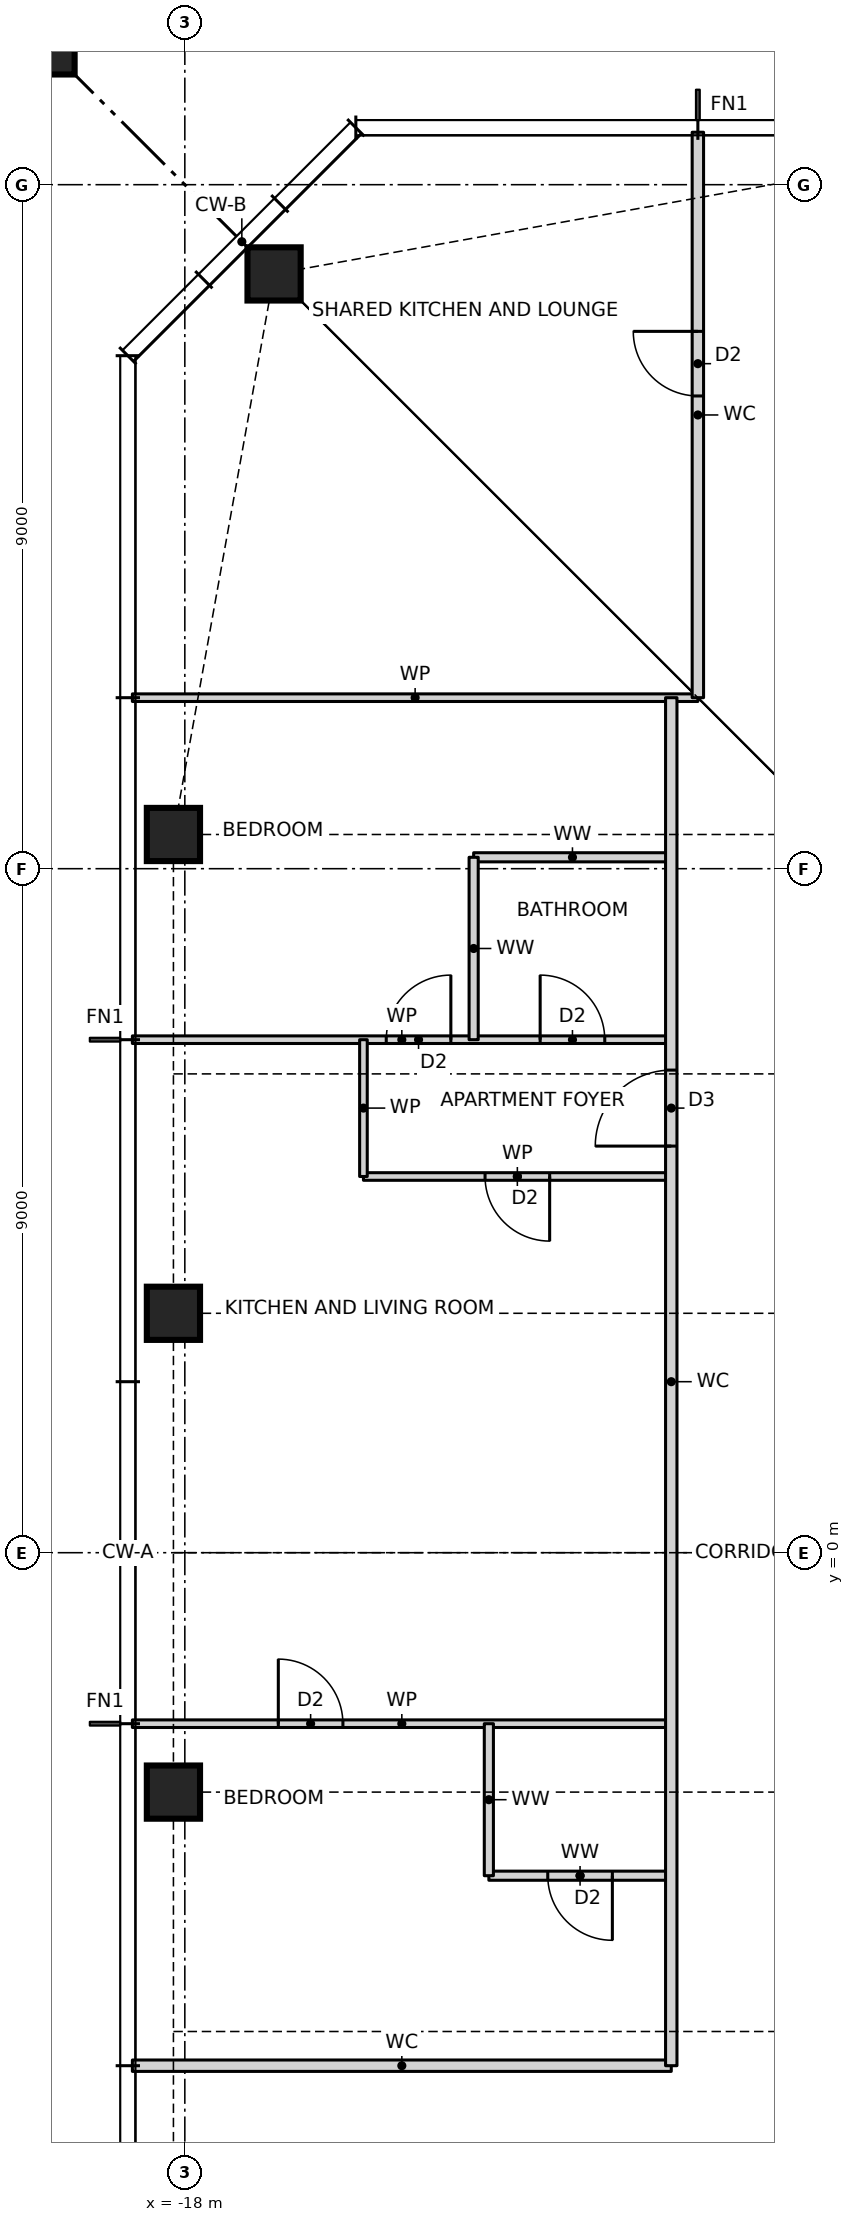
"""IFC4 building model, lengths in metres.
Left out: names, types, materials, properties, quantities, classifications, styles, units other than length and angle.
Written with IfcOpenShell. Run it as: python <this file> out.ifc"""

import sys

from ifc_helpers import new_model, si_unit, direction, frame, frame_2d, origin, origin_2d, place, context, subcontext, project, spatial, rectangle, hollow_rectangle, i_section, extrude, element, fill, save


model = new_model("IFC4")
c1 = context("Model", 3, precision=1e-05, world=origin(), true_north=direction((0.0, 1.0)))
c2 = subcontext(c1, "Body", "Model", "MODEL_VIEW")
j1 = project(units=[si_unit("LENGTHUNIT", "METRE"), si_unit("PLANEANGLEUNIT", "RADIAN")], contexts=[c1])
p1 = place(None, origin())
s1 = spatial("IfcSite", under=j1, at=p1, CompositionType="ELEMENT")
p2 = place(p1, origin())
s2 = spatial("IfcBuilding", under=s1, at=p2, CompositionType="ELEMENT")
p3 = place(p2, frame((0.0, 0.0, 181.0)))
s3 = spatial("IfcBuildingStorey", under=s2, at=p3, CompositionType="ELEMENT", Elevation=181.0)
for number, where, z_axis, x_axis in (
    (1, (-16.826, 16.826, 0.0), (0.0, 0.0, 1.0), (1.0, 0.0, 0.0)),
    (2, (-18.15, 9.45, 0.0), (0.0, 0.0, 1.0), (1.0, 0.0, 0.0)),
    (3, (-18.15, 3.15, 0.0), (0.0, 0.0, 1.0), (1.0, 0.0, 0.0)),
    (4, (-18.15, -3.15, 0.0), (0.0, 0.0, 1.0), (1.0, 0.0, 0.0)),
):
    element("IfcColumn", number, at=place(p3, frame(where, z_axis=z_axis, x_axis=x_axis)), inside=s3, PredefinedType="COLUMN", context=c2, shape_type="SweptSolid", body=[
        extrude(hollow_rectangle(XDim=0.7, YDim=0.7, WallThickness=0.06, at=origin_2d()), origin(), (0.0, 0.0, 1.0), 3.5),
    ])
p4 = place(p3, frame((-21.65, 21.65, 0.0), z_axis=(0.0, 0.0, 1.0), x_axis=(1.0, 0.0, 0.0)))
e5 = element("IfcColumn", 5, at=p4, inside=s3, PredefinedType="COLUMN", context=c2, shape_type="SweptSolid", body=[
    extrude(rectangle(XDim=4.4, YDim=4.4, at=origin_2d()), origin(), (0.0, 0.0, 1.0), 3.5),
    extrude(i_section(OverallWidth=0.478, OverallDepth=0.599, WebThickness=0.1, FlangeThickness=0.14, at=origin_2d()), origin(), (0.0, 0.0, 1.0), 3.5),
])
p5 = place(p3, frame((-18.69, -6.75, 0.0), z_axis=(0.0, 0.0, 1.0), x_axis=(1.0, 0.0, 0.0)))
e6 = element("IfcWall", 6, at=p5, inside=s3, PredefinedType="PARTITIONING", context=c2, shape_type="SweptSolid", body=[
    extrude(rectangle(XDim=7.09, YDim=0.15, at=frame_2d((3.545, 0.0))), origin(), (0.0, 0.0, 1.0), 3.27),
])
p6 = place(p3, frame((-14.0, -4.25, 0.0), z_axis=(0.0, 0.0, 1.0), x_axis=(1.0, 0.0, 0.0)))
e7 = element("IfcWall", 7, at=p6, inside=s3, PredefinedType="PARTITIONING", context=c2, shape_type="SweptSolid", body=[
    extrude(rectangle(XDim=2.4, YDim=0.12, at=frame_2d((1.2, 0.0))), origin(), (0.0, 0.0, 1.0), 3.27),
])
p7 = place(p6, frame((0.775, 0.0, 0.0)))
e8 = element("IfcOpeningElement", 8, at=p7, cuts=e7, PredefinedType="OPENING", context=c2, shape_type="SweptSolid", body=[
    extrude(rectangle(XDim=0.85, YDim=2.1, at=frame_2d((0.425, 1.05))), frame((0.0, 0.07, 0.0), z_axis=(0.0, -1.0, 0.0), x_axis=(1.0, 0.0, 0.0)), (0.0, 0.0, 1.0), 0.14),
])
p8 = place(p3, frame((-18.69, -2.25, 0.0), z_axis=(0.0, 0.0, 1.0), x_axis=(1.0, 0.0, 0.0)))
e9 = element("IfcWall", 9, at=p8, inside=s3, PredefinedType="PARTITIONING", context=c2, shape_type="SweptSolid", body=[
    extrude(rectangle(XDim=7.09, YDim=0.1, at=frame_2d((3.545, 0.0))), origin(), (0.0, 0.0, 1.0), 3.27),
])
p9 = place(p8, frame((1.92, 0.0, 0.0)))
e10 = element("IfcOpeningElement", 10, at=p9, cuts=e9, PredefinedType="OPENING", context=c2, shape_type="SweptSolid", body=[
    extrude(rectangle(XDim=0.85, YDim=2.1, at=frame_2d((0.425, 1.05))), frame((0.0, 0.06, 0.0), z_axis=(0.0, -1.0, 0.0), x_axis=(1.0, 0.0, 0.0)), (0.0, 0.0, 1.0), 0.12),
])
p10 = place(p3, frame((-15.65, 4.95, 0.0), z_axis=(0.0, 0.0, 1.0), x_axis=(1.0, 0.0, 0.0)))
e11 = element("IfcWall", 11, at=p10, inside=s3, PredefinedType="PARTITIONING", context=c2, shape_type="SweptSolid", body=[
    extrude(rectangle(XDim=4.05, YDim=0.1, at=frame_2d((2.025, 0.0))), origin(), (0.0, 0.0, 1.0), 3.27),
])
p11 = place(p10, frame((1.6, 0.0, 0.0)))
e12 = element("IfcOpeningElement", 12, at=p11, cuts=e11, PredefinedType="OPENING", context=c2, shape_type="SweptSolid", body=[
    extrude(rectangle(XDim=0.85, YDim=2.1, at=frame_2d((0.425, 1.05))), frame((0.0, 0.06, 0.0), z_axis=(0.0, -1.0, 0.0), x_axis=(1.0, 0.0, 0.0)), (0.0, 0.0, 1.0), 0.12),
])
p12 = place(p3, frame((-18.69, 6.75, 0.0), z_axis=(0.0, 0.0, 1.0), x_axis=(1.0, 0.0, 0.0)))
e13 = element("IfcWall", 13, at=p12, inside=s3, PredefinedType="PARTITIONING", context=c2, shape_type="SweptSolid", body=[
    extrude(rectangle(XDim=7.09, YDim=0.1, at=frame_2d((3.545, 0.0))), origin(), (0.0, 0.0, 1.0), 3.27),
])
p13 = place(p12, frame((3.34, 0.0, 0.0)))
e14 = element("IfcOpeningElement", 14, at=p13, cuts=e13, PredefinedType="OPENING", context=c2, shape_type="SweptSolid", body=[
    extrude(rectangle(XDim=0.85, YDim=2.1, at=frame_2d((0.425, 1.05))), frame((0.0, 0.06, 0.0), z_axis=(0.0, -1.0, 0.0), x_axis=(1.0, 0.0, 0.0)), (0.0, 0.0, 1.0), 0.12),
])
p14 = place(p12, frame((5.365, 0.0, 0.0)))
e15 = element("IfcOpeningElement", 15, at=p14, cuts=e13, PredefinedType="OPENING", context=c2, shape_type="SweptSolid", body=[
    extrude(rectangle(XDim=0.85, YDim=2.1, at=frame_2d((0.425, 1.05))), frame((0.0, 0.06, 0.0), z_axis=(0.0, -1.0, 0.0), x_axis=(1.0, 0.0, 0.0)), (0.0, 0.0, 1.0), 0.12),
])
p15 = place(p3, frame((-14.2, 9.15, 0.0), z_axis=(0.0, 0.0, 1.0), x_axis=(1.0, 0.0, 0.0)))
e16 = element("IfcWall", 16, at=p15, inside=s3, PredefinedType="PARTITIONING", context=c2, shape_type="SweptSolid", body=[
    extrude(rectangle(XDim=2.6, YDim=0.12, at=frame_2d((1.3, 0.0))), origin(), (0.0, 0.0, 1.0), 3.27),
])
p16 = place(p3, frame((-18.69, 11.25, 0.0), z_axis=(0.0, 0.0, 1.0), x_axis=(1.0, 0.0, 0.0)))
e17 = element("IfcWall", 17, at=p16, inside=s3, PredefinedType="PARTITIONING", context=c2, shape_type="SweptSolid", body=[
    extrude(rectangle(XDim=7.44, YDim=0.1, at=frame_2d((3.72, 0.0))), origin(), (0.0, 0.0, 1.0), 3.27),
])
p17 = place(p3, frame((-11.25, 11.25, 0.0), z_axis=(0.0, 0.0, 1.0), x_axis=(0.0, 1.0, 0.0)))
e18 = element("IfcWall", 18, at=p17, inside=s3, PredefinedType="PARTITIONING", context=c2, shape_type="SweptSolid", body=[
    extrude(rectangle(XDim=7.44, YDim=0.15, at=frame_2d((3.72, 0.0))), origin(), (0.0, 0.0, 1.0), 3.27),
])
p18 = place(p17, frame((3.97, 0.0, 0.0)))
e19 = element("IfcOpeningElement", 19, at=p18, cuts=e18, PredefinedType="OPENING", context=c2, shape_type="SweptSolid", body=[
    extrude(rectangle(XDim=0.85, YDim=2.1, at=frame_2d((0.425, 1.05))), frame((0.0, 0.085, 0.0), z_axis=(0.0, -1.0, 0.0), x_axis=(1.0, 0.0, 0.0)), (0.0, 0.0, 1.0), 0.17),
])
p19 = place(p3, frame((-11.6, -6.75, 0.0), z_axis=(0.0, 0.0, 1.0), x_axis=(0.0, 1.0, 0.0)))
e20 = element("IfcWall", 20, at=p19, inside=s3, PredefinedType="PARTITIONING", context=c2, shape_type="SweptSolid", body=[
    extrude(rectangle(XDim=18.0, YDim=0.15, at=frame_2d((9.0, 0.0))), origin(), (0.0, 0.0, 1.0), 3.27),
])
p20 = place(p19, frame((12.1, 0.0, 0.0)))
e21 = element("IfcOpeningElement", 21, at=p20, cuts=e20, PredefinedType="OPENING", context=c2, shape_type="SweptSolid", body=[
    extrude(rectangle(XDim=1.0, YDim=2.1, at=frame_2d((0.5, 1.05))), frame((0.0, 0.085, 0.0), z_axis=(0.0, -1.0, 0.0), x_axis=(1.0, 0.0, 0.0)), (0.0, 0.0, 1.0), 0.17),
])
p21 = place(p3, frame((-14.0, -4.25, 0.0), z_axis=(0.0, 0.0, 1.0), x_axis=(0.0, 1.0, 0.0)))
e22 = element("IfcWall", 22, at=p21, inside=s3, PredefinedType="PARTITIONING", context=c2, shape_type="SweptSolid", body=[
    extrude(rectangle(XDim=2.0, YDim=0.12, at=frame_2d((1.0, 0.0))), origin(), (0.0, 0.0, 1.0), 3.27),
])
p22 = place(p3, frame((-14.2, 6.75, 0.0), z_axis=(0.0, 0.0, 1.0), x_axis=(0.0, 1.0, 0.0)))
e23 = element("IfcWall", 23, at=p22, inside=s3, PredefinedType="PARTITIONING", context=c2, shape_type="SweptSolid", body=[
    extrude(rectangle(XDim=2.4, YDim=0.12, at=frame_2d((1.2, 0.0))), origin(), (0.0, 0.0, 1.0), 3.27),
])
p23 = place(p3, frame((-15.65, 4.95, 0.0), z_axis=(0.0, 0.0, 1.0), x_axis=(0.0, 1.0, 0.0)))
e24 = element("IfcWall", 24, at=p23, inside=s3, PredefinedType="PARTITIONING", context=c2, shape_type="SweptSolid", body=[
    extrude(rectangle(XDim=1.8, YDim=0.1, at=frame_2d((0.9, 0.0))), origin(), (0.0, 0.0, 1.0), 3.27),
])
p24 = place(p20, origin())
e25 = element("IfcDoor", 25, at=p24, inside=s3, OperationType="SINGLE_SWING_LEFT", PredefinedType="DOOR", context=c2, shape_type="SweptSolid", body=[
    extrude(rectangle(XDim=1.0, YDim=2.1, at=frame_2d((0.5, 1.05))), frame((0.0, 0.025, 0.0), z_axis=(0.0, -1.0, 0.0), x_axis=(1.0, 0.0, 0.0)), (0.0, 0.0, 1.0), 0.05),
])
fill(e21, e25)
p25 = place(p11, frame((0.85, 0.0, 0.0), z_axis=(0.0, 0.0, 1.0), x_axis=(-1.0, 0.0, 0.0)))
e26 = element("IfcDoor", 26, at=p25, inside=s3, OperationType="SINGLE_SWING_LEFT", PredefinedType="DOOR", context=c2, shape_type="SweptSolid", body=[
    extrude(rectangle(XDim=0.85, YDim=2.1, at=frame_2d((0.425, 1.05))), frame((0.0, 0.025, 0.0), z_axis=(0.0, -1.0, 0.0), x_axis=(1.0, 0.0, 0.0)), (0.0, 0.0, 1.0), 0.05),
])
fill(e12, e26)
p26 = place(p13, origin())
e27 = element("IfcDoor", 27, at=p26, inside=s3, OperationType="SINGLE_SWING_RIGHT", PredefinedType="DOOR", context=c2, shape_type="SweptSolid", body=[
    extrude(rectangle(XDim=0.85, YDim=2.1, at=frame_2d((0.425, 1.05))), frame((0.0, 0.025, 0.0), z_axis=(0.0, -1.0, 0.0), x_axis=(1.0, 0.0, 0.0)), (0.0, 0.0, 1.0), 0.05),
])
fill(e14, e27)
p27 = place(p14, origin())
e28 = element("IfcDoor", 28, at=p27, inside=s3, OperationType="SINGLE_SWING_LEFT", PredefinedType="DOOR", context=c2, shape_type="SweptSolid", body=[
    extrude(rectangle(XDim=0.85, YDim=2.1, at=frame_2d((0.425, 1.05))), frame((0.0, 0.025, 0.0), z_axis=(0.0, -1.0, 0.0), x_axis=(1.0, 0.0, 0.0)), (0.0, 0.0, 1.0), 0.05),
])
fill(e15, e28)
p28 = place(p9, origin())
e29 = element("IfcDoor", 29, at=p28, inside=s3, OperationType="SINGLE_SWING_LEFT", PredefinedType="DOOR", context=c2, shape_type="SweptSolid", body=[
    extrude(rectangle(XDim=0.85, YDim=2.1, at=frame_2d((0.425, 1.05))), frame((0.0, 0.025, 0.0), z_axis=(0.0, -1.0, 0.0), x_axis=(1.0, 0.0, 0.0)), (0.0, 0.0, 1.0), 0.05),
])
fill(e10, e29)
p29 = place(p7, frame((0.85, 0.0, 0.0), z_axis=(0.0, 0.0, 1.0), x_axis=(-1.0, 0.0, 0.0)))
e30 = element("IfcDoor", 30, at=p29, inside=s3, OperationType="SINGLE_SWING_LEFT", PredefinedType="DOOR", context=c2, shape_type="SweptSolid", body=[
    extrude(rectangle(XDim=0.85, YDim=2.1, at=frame_2d((0.425, 1.05))), frame((0.0, 0.025, 0.0), z_axis=(0.0, -1.0, 0.0), x_axis=(1.0, 0.0, 0.0)), (0.0, 0.0, 1.0), 0.05),
])
fill(e8, e30)
p30 = place(p18, origin())
e31 = element("IfcDoor", 31, at=p30, inside=s3, OperationType="SINGLE_SWING_RIGHT", PredefinedType="DOOR", context=c2, shape_type="SweptSolid", body=[
    extrude(rectangle(XDim=0.85, YDim=2.1, at=frame_2d((0.425, 1.05))), frame((0.0, 0.025, 0.0), z_axis=(0.0, -1.0, 0.0), x_axis=(1.0, 0.0, 0.0)), (0.0, 0.0, 1.0), 0.05),
])
fill(e19, e31)
save(model, sys.argv[1])
